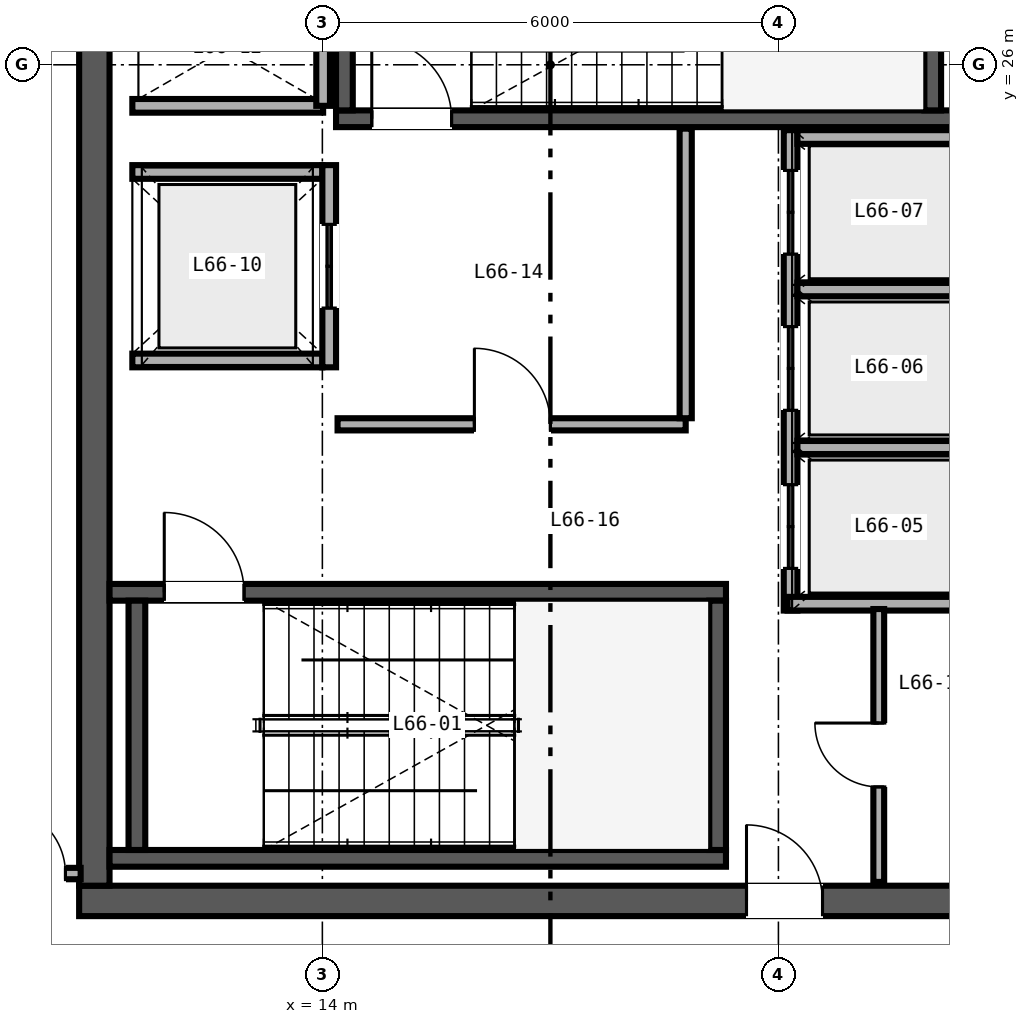
"""IFC4 building model, lengths in metres.
Left out: names, types, materials, properties, quantities, classifications, styles, units other than length and angle.
Written with IfcOpenShell. Run it as: python <this file> out.ifc"""

import sys

from ifc_helpers import new_model, si_unit, direction, frame, frame_2d, origin, place, context, subcontext, project, spatial, rectangle, extrude, source, transform, mapped, element, fill, save


model = new_model("IFC4")
c1 = context("Model", 3, precision=1e-05, world=origin(), true_north=direction((0.0, 1.0)))
c2 = subcontext(c1, "Body", "Model", "MODEL_VIEW")
j1 = project(units=[si_unit("LENGTHUNIT", "METRE"), si_unit("PLANEANGLEUNIT", "RADIAN")], contexts=[c1])
p1 = place(None, origin())
s1 = spatial("IfcSite", under=j1, at=p1, CompositionType="ELEMENT")
p2 = place(p1, origin())
s2 = spatial("IfcBuilding", under=s1, at=p2, CompositionType="ELEMENT")
p3 = place(p2, frame((0.0, 0.0, 261.6)))
s3 = spatial("IfcBuildingStorey", under=s2, at=p3, CompositionType="ELEMENT", Elevation=261.6)
p4 = place(p3, frame((10.8, 15.0, 0.0), z_axis=(0.0, 0.0, 1.0), x_axis=(1.0, 0.0, 0.0)))
e1 = element("IfcWall", 1, at=p4, inside=s3, PredefinedType="SHEAR", context=c2, shape_type="SweptSolid", body=[
    extrude(rectangle(XDim=12.4, YDim=0.4, at=frame_2d((6.2, 0.0))), origin(), (0.0, 0.0, 1.0), 3.38),
])
p5 = place(p4, frame((8.78, 0.0, 0.0)))
e2 = element("IfcOpeningElement", 2, at=p5, cuts=e1, PredefinedType="OPENING", context=c2, shape_type="SweptSolid", body=[
    extrude(rectangle(XDim=1.0, YDim=2.15, at=frame_2d((0.5, 1.075))), frame((0.0, 0.21, 0.0), z_axis=(0.0, -1.0, 0.0), x_axis=(1.0, 0.0, 0.0)), (0.0, 0.0, 1.0), 0.42),
])
p6 = place(p3, frame((11.0, 15.2, 0.0), z_axis=(0.0, 0.0, 1.0), x_axis=(0.0, 1.0, 0.0)))
e3 = element("IfcWall", 3, at=p6, inside=s3, PredefinedType="SHEAR", context=c2, shape_type="SweptSolid", body=[
    extrude(rectangle(XDim=21.6, YDim=0.4, at=frame_2d((10.8, 0.0))), origin(), (0.0, 0.0, 1.0), 3.38),
])
p7 = place(p3, frame((11.2, 15.56, 0.0), z_axis=(0.0, 0.0, 1.0), x_axis=(1.0, 0.0, 0.0)))
e4 = element("IfcWall", 4, at=p7, inside=s3, PredefinedType="SHEAR", context=c2, shape_type="SweptSolid", body=[
    extrude(rectangle(XDim=8.11, YDim=0.22, at=frame_2d((4.055, 0.0))), origin(), (0.0, 0.0, 1.0), 3.4),
])
p8 = place(p3, frame((11.2, 19.06, 0.0), z_axis=(0.0, 0.0, 1.0), x_axis=(1.0, 0.0, 0.0)))
e5 = element("IfcWall", 5, at=p8, inside=s3, PredefinedType="SHEAR", context=c2, shape_type="SweptSolid", body=[
    extrude(rectangle(XDim=8.11, YDim=0.22, at=frame_2d((4.055, 0.0))), origin(), (0.0, 0.0, 1.0), 3.4),
])
p9 = place(p8, frame((0.72, 0.0, 0.0)))
e6 = element("IfcOpeningElement", 6, at=p9, cuts=e5, PredefinedType="OPENING", context=c2, shape_type="SweptSolid", body=[
    extrude(rectangle(XDim=1.05, YDim=2.15, at=frame_2d((0.525, 1.075))), frame((0.0, 0.12, 0.0), z_axis=(0.0, -1.0, 0.0), x_axis=(1.0, 0.0, 0.0)), (0.0, 0.0, 1.0), 0.24),
])
for number, where, z_axis, x_axis in (
    (7, (11.56, 15.67, 0.0), (0.0, 0.0, 1.0), (0.0, 1.0, 0.0)),
    (8, (19.2, 15.67, 0.0), (0.0, 0.0, 1.0), (0.0, 1.0, 0.0)),
):
    element("IfcWall", number, at=place(p3, frame(where, z_axis=z_axis, x_axis=x_axis)), inside=s3, PredefinedType="SHEAR", context=c2, shape_type="SweptSolid", body=[
        extrude(rectangle(XDim=3.28, YDim=0.22, at=frame_2d((1.64, 0.0))), origin(), (0.0, 0.0, 1.0), 3.4),
    ])
p10 = place(p3, frame((14.18, 25.29, 0.0), z_axis=(0.0, 0.0, 1.0), x_axis=(1.0, 0.0, 0.0)))
e9 = element("IfcWall", 9, at=p10, inside=s3, PredefinedType="SHEAR", context=c2, shape_type="SweptSolid", body=[
    extrude(rectangle(XDim=8.62, YDim=0.22, at=frame_2d((4.31, 0.0))), origin(), (0.0, 0.0, 1.0), 3.4),
])
p11 = place(p10, frame((0.47, 0.0, 0.0)))
e10 = element("IfcOpeningElement", 10, at=p11, cuts=e9, PredefinedType="OPENING", context=c2, shape_type="SweptSolid", body=[
    extrude(rectangle(XDim=1.05, YDim=2.15, at=frame_2d((0.525, 1.075))), frame((0.0, 0.12, 0.0), z_axis=(0.0, -1.0, 0.0), x_axis=(1.0, 0.0, 0.0)), (0.0, 0.0, 1.0), 0.24),
])
for number, where, z_axis, x_axis in (
    (11, (14.29, 25.4, 0.0), (0.0, 0.0, 1.0), (0.0, 1.0, 0.0)),
    (12, (22.03, 25.4, 0.0), (0.0, 0.0, 1.0), (0.0, 1.0, 0.0)),
):
    element("IfcWall", number, at=place(p3, frame(where, z_axis=z_axis, x_axis=x_axis)), inside=s3, PredefinedType="SHEAR", context=c2, shape_type="SweptSolid", body=[
        extrude(rectangle(XDim=3.28, YDim=0.22, at=frame_2d((1.64, 0.0))), origin(), (0.0, 0.0, 1.0), 3.4),
    ])
p12 = place(p3, frame((20.16, 18.82, 0.0), z_axis=(0.0, 0.0, 1.0), x_axis=(0.0, 1.0, 0.0)))
e13 = element("IfcWall", 13, at=p12, inside=s3, PredefinedType="SOLIDWALL", context=c2, shape_type="SweptSolid", body=[
    extrude(rectangle(XDim=6.32, YDim=0.18, at=frame_2d((3.16, 0.0))), origin(), (0.0, 0.0, 1.0), 2.48),
])
p13 = place(p12, frame((0.555, 0.0, 0.0)))
e14 = element("IfcOpeningElement", 14, at=p13, cuts=e13, PredefinedType="OPENING", context=c2, shape_type="SweptSolid", body=[
    extrude(rectangle(XDim=1.1, YDim=2.2, at=frame_2d((0.55, 1.1))), frame((0.0, 0.1, 0.0), z_axis=(0.0, -1.0, 0.0), x_axis=(1.0, 0.0, 0.0)), (0.0, 0.0, 1.0), 0.2),
])
p14 = place(p12, frame((2.635, 0.0, 0.0)))
e15 = element("IfcOpeningElement", 15, at=p14, cuts=e13, PredefinedType="OPENING", context=c2, shape_type="SweptSolid", body=[
    extrude(rectangle(XDim=1.1, YDim=2.2, at=frame_2d((0.55, 1.1))), frame((0.0, 0.1, 0.0), z_axis=(0.0, -1.0, 0.0), x_axis=(1.0, 0.0, 0.0)), (0.0, 0.0, 1.0), 0.2),
])
p15 = place(p12, frame((4.69, 0.0, 0.0)))
e16 = element("IfcOpeningElement", 16, at=p15, cuts=e13, PredefinedType="OPENING", context=c2, shape_type="SweptSolid", body=[
    extrude(rectangle(XDim=1.1, YDim=2.2, at=frame_2d((0.55, 1.1))), frame((0.0, 0.1, 0.0), z_axis=(0.0, -1.0, 0.0), x_axis=(1.0, 0.0, 0.0)), (0.0, 0.0, 1.0), 0.2),
])
p16 = place(p3, frame((20.12, 18.91, 0.0), z_axis=(0.0, 0.0, 1.0), x_axis=(1.0, 0.0, 0.0)))
e17 = element("IfcWall", 17, at=p16, inside=s3, PredefinedType="SOLIDWALL", context=c2, shape_type="SweptSolid", body=[
    extrude(rectangle(XDim=2.63, YDim=0.18, at=frame_2d((1.315, 0.0))), origin(), (0.0, 0.0, 1.0), 3.38),
])
p17 = place(p3, frame((20.25, 25.05, 0.0), z_axis=(0.0, 0.0, 1.0), x_axis=(1.0, 0.0, 0.0)))
e18 = element("IfcWall", 18, at=p17, inside=s3, PredefinedType="SOLIDWALL", context=c2, shape_type="SweptSolid", body=[
    extrude(rectangle(XDim=2.36, YDim=0.18, at=frame_2d((1.18, 0.0))), origin(), (0.0, 0.0, 1.0), 3.38),
])
p18 = place(p3, frame((20.25, 20.965, 0.0), z_axis=(0.0, 0.0, 1.0), x_axis=(1.0, 0.0, 0.0)))
e19 = element("IfcWall", 19, at=p18, inside=s3, PredefinedType="SOLIDWALL", context=c2, shape_type="SweptSolid", body=[
    extrude(rectangle(XDim=2.36, YDim=0.18, at=frame_2d((1.18, 0.0))), origin(), (0.0, 0.0, 1.0), 2.48),
])
p19 = place(p3, frame((20.25, 23.045, 0.0), z_axis=(0.0, 0.0, 1.0), x_axis=(1.0, 0.0, 0.0)))
e20 = element("IfcWall", 20, at=p19, inside=s3, PredefinedType="SOLIDWALL", context=c2, shape_type="SweptSolid", body=[
    extrude(rectangle(XDim=2.36, YDim=0.18, at=frame_2d((1.18, 0.0))), origin(), (0.0, 0.0, 1.0), 3.38),
])
for number, where, z_axis, x_axis in (
    (21, (11.5, 22.11, 0.0), (0.0, 0.0, 1.0), (1.0, 0.0, 0.0)),
    (22, (11.5, 24.59, 0.0), (0.0, 0.0, 1.0), (1.0, 0.0, 0.0)),
):
    element("IfcWall", number, at=place(p3, frame(where, z_axis=z_axis, x_axis=x_axis)), inside=s3, PredefinedType="SOLIDWALL", context=c2, shape_type="SweptSolid", body=[
        extrude(rectangle(XDim=2.5, YDim=0.18, at=frame_2d((1.25, 0.0))), origin(), (0.0, 0.0, 1.0), 3.38),
    ])
p20 = place(p3, frame((14.09, 22.02, 0.0), z_axis=(0.0, 0.0, 1.0), x_axis=(0.0, 1.0, 0.0)))
e23 = element("IfcWall", 23, at=p20, inside=s3, PredefinedType="SOLIDWALL", context=c2, shape_type="SweptSolid", body=[
    extrude(rectangle(XDim=2.66, YDim=0.18, at=frame_2d((1.33, 0.0))), origin(), (0.0, 0.0, 1.0), 3.38),
])
p21 = place(p20, frame((0.78, 0.0, 0.0)))
e24 = element("IfcOpeningElement", 24, at=p21, cuts=e23, PredefinedType="OPENING", context=c2, shape_type="SweptSolid", body=[
    extrude(rectangle(XDim=1.1, YDim=2.2, at=frame_2d((0.55, 1.1))), frame((0.0, 0.1, 0.0), z_axis=(0.0, -1.0, 0.0), x_axis=(1.0, 0.0, 0.0)), (0.0, 0.0, 1.0), 0.2),
])
p22 = place(p3, frame((11.5, 25.46, 0.0), z_axis=(0.0, 0.0, 1.0), x_axis=(1.0, 0.0, 0.0)))
e25 = element("IfcWall", 25, at=p22, inside=s3, PredefinedType="SOLIDWALL", context=c2, shape_type="SweptSolid", body=[
    extrude(rectangle(XDim=2.51, YDim=0.18, at=frame_2d((1.255, 0.0))), origin(), (0.0, 0.0, 1.0), 3.38),
])
p23 = place(p3, frame((14.01, 25.46, 0.0), z_axis=(0.0, 0.0, 1.0), x_axis=(0.0, 1.0, 0.0)))
e26 = element("IfcWall", 26, at=p23, inside=s3, PredefinedType="SOLIDWALL", context=c2, shape_type="SweptSolid", body=[
    extrude(rectangle(XDim=3.08, YDim=0.18, at=frame_2d((1.54, 0.0))), origin(), (0.0, 0.0, 1.0), 3.38),
])
p24 = place(p3, frame((14.2, 21.27, 0.0), z_axis=(0.0, 0.0, 1.0), x_axis=(1.0, 0.0, 0.0)))
e27 = element("IfcWall", 27, at=p24, inside=s3, PredefinedType="PARTITIONING", context=c2, shape_type="SweptSolid", body=[
    extrude(rectangle(XDim=4.58, YDim=0.16, at=frame_2d((2.29, 0.0))), origin(), (0.0, 0.0, 1.0), 3.38),
])
p25 = place(p24, frame((1.8, 0.0, 0.0)))
e28 = element("IfcOpeningElement", 28, at=p25, cuts=e27, PredefinedType="OPENING", context=c2, shape_type="SweptSolid", body=[
    extrude(rectangle(XDim=1.0, YDim=2.15, at=frame_2d((0.5, 1.075))), frame((0.0, 0.09, 0.0), z_axis=(0.0, -1.0, 0.0), x_axis=(1.0, 0.0, 0.0)), (0.0, 0.0, 1.0), 0.18),
])
p26 = place(p3, frame((18.78, 21.35, 0.0), z_axis=(0.0, 0.0, 1.0), x_axis=(0.0, 1.0, 0.0)))
e29 = element("IfcWall", 29, at=p26, inside=s3, PredefinedType="PARTITIONING", context=c2, shape_type="SweptSolid", body=[
    extrude(rectangle(XDim=3.81, YDim=0.16, at=frame_2d((1.905, 0.0))), origin(), (0.0, 0.0, 1.0), 3.38),
])
p27 = place(p3, frame((21.32, 15.25, 0.0), z_axis=(0.0, 0.0, 1.0), x_axis=(0.0, 1.0, 0.0)))
e30 = element("IfcWall", 30, at=p27, inside=s3, PredefinedType="PARTITIONING", context=c2, shape_type="SweptSolid", body=[
    extrude(rectangle(XDim=3.59, YDim=0.142, at=frame_2d((1.795, 0.0))), origin(), (0.0, 0.0, 1.0), 3.38),
])
p28 = place(p27, frame((1.25, 0.0, 0.0)))
e31 = element("IfcOpeningElement", 31, at=p28, cuts=e30, PredefinedType="OPENING", context=c2, shape_type="SweptSolid", body=[
    extrude(rectangle(XDim=0.84, YDim=2.1, at=frame_2d((0.42, 1.05))), frame((0.0, 0.081, 0.0), z_axis=(0.0, -1.0, 0.0), x_axis=(1.0, 0.0, 0.0)), (0.0, 0.0, 1.0), 0.162),
])
p29 = place(p3, frame((8.16, 15.36, 0.0), z_axis=(0.0, 0.0, 1.0), x_axis=(1.0, 0.0, 0.0)))
e32 = element("IfcWall", 32, at=p29, inside=s3, PredefinedType="PARTITIONING", context=c2, shape_type="SweptSolid", body=[
    extrude(rectangle(XDim=2.66, YDim=0.15, at=frame_2d((1.33, 0.0))), origin(), (0.0, 0.0, 1.0), 2.601),
])
p30 = place(p29, frame((1.58, 0.0, 0.0)))
e33 = element("IfcOpeningElement", 33, at=p30, cuts=e32, PredefinedType="OPENING", context=c2, shape_type="SweptSolid", body=[
    extrude(rectangle(XDim=0.88, YDim=2.15, at=frame_2d((0.44, 1.075))), frame((0.0, 0.085, 0.0), z_axis=(0.0, -1.0, 0.0), x_axis=(1.0, 0.0, 0.0)), (0.0, 0.0, 1.0), 0.17),
])
m1 = source(origin(), c2, "Body", "SweptSolid", [
    extrude(rectangle(XDim=1.05, YDim=2.15, at=frame_2d((0.525, 1.075))), frame((0.0, 0.025, 0.0), z_axis=(0.0, -1.0, 0.0), x_axis=(1.0, 0.0, 0.0)), (0.0, 0.0, 1.0), 0.05),
])
p31 = place(p9, origin())
e34 = element("IfcDoor", 34, at=p31, inside=s3, OperationType="SINGLE_SWING_LEFT", PredefinedType="DOOR", context=c2, shape_type="MappedRepresentation", body=[
    mapped(m1, transform((0.0, 0.0, 0.0), scale=1.0)),
])
fill(e6, e34)
p32 = place(p11, origin())
e35 = element("IfcDoor", 35, at=p32, inside=s3, OperationType="SINGLE_SWING_LEFT", PredefinedType="DOOR", context=c2, shape_type="MappedRepresentation", body=[
    mapped(m1, transform((0.0, 0.0, 0.0), scale=1.0)),
])
fill(e10, e35)
m2 = source(origin(), c2, "Body", "SweptSolid", [
    extrude(rectangle(XDim=1.1, YDim=2.2, at=frame_2d((0.55, 1.1))), frame((0.0, 0.025, 0.0), z_axis=(0.0, -1.0, 0.0), x_axis=(1.0, 0.0, 0.0)), (0.0, 0.0, 1.0), 0.05),
])
p33 = place(p13, origin())
e36 = element("IfcDoor", 36, at=p33, inside=s3, OperationType="DOUBLE_DOOR_SLIDING", PredefinedType="DOOR", context=c2, shape_type="MappedRepresentation", body=[
    mapped(m2, transform((0.0, 0.0, 0.0), scale=1.0)),
])
fill(e14, e36)
p34 = place(p14, origin())
e37 = element("IfcDoor", 37, at=p34, inside=s3, OperationType="DOUBLE_DOOR_SLIDING", PredefinedType="DOOR", context=c2, shape_type="MappedRepresentation", body=[
    mapped(m2, transform((0.0, 0.0, 0.0), scale=1.0)),
])
fill(e15, e37)
p35 = place(p15, origin())
e38 = element("IfcDoor", 38, at=p35, inside=s3, OperationType="DOUBLE_DOOR_SLIDING", PredefinedType="DOOR", context=c2, shape_type="MappedRepresentation", body=[
    mapped(m2, transform((0.0, 0.0, 0.0), scale=1.0)),
])
fill(e16, e38)
p36 = place(p21, origin())
e39 = element("IfcDoor", 39, at=p36, inside=s3, OperationType="DOUBLE_DOOR_SLIDING", PredefinedType="DOOR", context=c2, shape_type="MappedRepresentation", body=[
    mapped(m2, transform((0.0, 0.0, 0.0), scale=1.0)),
])
fill(e24, e39)
m3 = source(origin(), c2, "Body", "SweptSolid", [
    extrude(rectangle(XDim=1.0, YDim=2.15, at=frame_2d((0.5, 1.075))), frame((0.0, 0.025, 0.0), z_axis=(0.0, -1.0, 0.0), x_axis=(1.0, 0.0, 0.0)), (0.0, 0.0, 1.0), 0.05),
])
p37 = place(p25, origin())
e40 = element("IfcDoor", 40, at=p37, inside=s3, OperationType="SINGLE_SWING_LEFT", PredefinedType="DOOR", context=c2, shape_type="MappedRepresentation", body=[
    mapped(m3, transform((0.0, 0.0, 0.0), scale=1.0)),
])
fill(e28, e40)
m4 = source(origin(), c2, "Body", "SweptSolid", [
    extrude(rectangle(XDim=0.84, YDim=2.1, at=frame_2d((0.42, 1.05))), frame((0.0, 0.025, 0.0), z_axis=(0.0, -1.0, 0.0), x_axis=(1.0, 0.0, 0.0)), (0.0, 0.0, 1.0), 0.05),
])
p38 = place(p28, origin())
e41 = element("IfcDoor", 41, at=p38, inside=s3, OperationType="SINGLE_SWING_RIGHT", PredefinedType="DOOR", context=c2, shape_type="MappedRepresentation", body=[
    mapped(m4, transform((0.0, 0.0, 0.0), scale=1.0)),
])
fill(e31, e41)
p39 = place(p5, origin())
e42 = element("IfcDoor", 42, at=p39, inside=s3, OperationType="SINGLE_SWING_LEFT", PredefinedType="DOOR", context=c2, shape_type="MappedRepresentation", body=[
    mapped(m3, transform((0.0, 0.0, 0.0), scale=1.0)),
])
fill(e2, e42)
m5 = source(origin(), c2, "Body", "SweptSolid", [
    extrude(rectangle(XDim=0.88, YDim=2.15, at=frame_2d((0.44, 1.075))), frame((0.0, 0.025, 0.0), z_axis=(0.0, -1.0, 0.0), x_axis=(1.0, 0.0, 0.0)), (0.0, 0.0, 1.0), 0.05),
])
p40 = place(p30, origin())
e43 = element("IfcDoor", 43, at=p40, inside=s3, OperationType="SINGLE_SWING_LEFT", PredefinedType="DOOR", context=c2, shape_type="MappedRepresentation", body=[
    mapped(m5, transform((0.0, 0.0, 0.0), scale=1.0)),
])
fill(e33, e43)
save(model, sys.argv[1])
